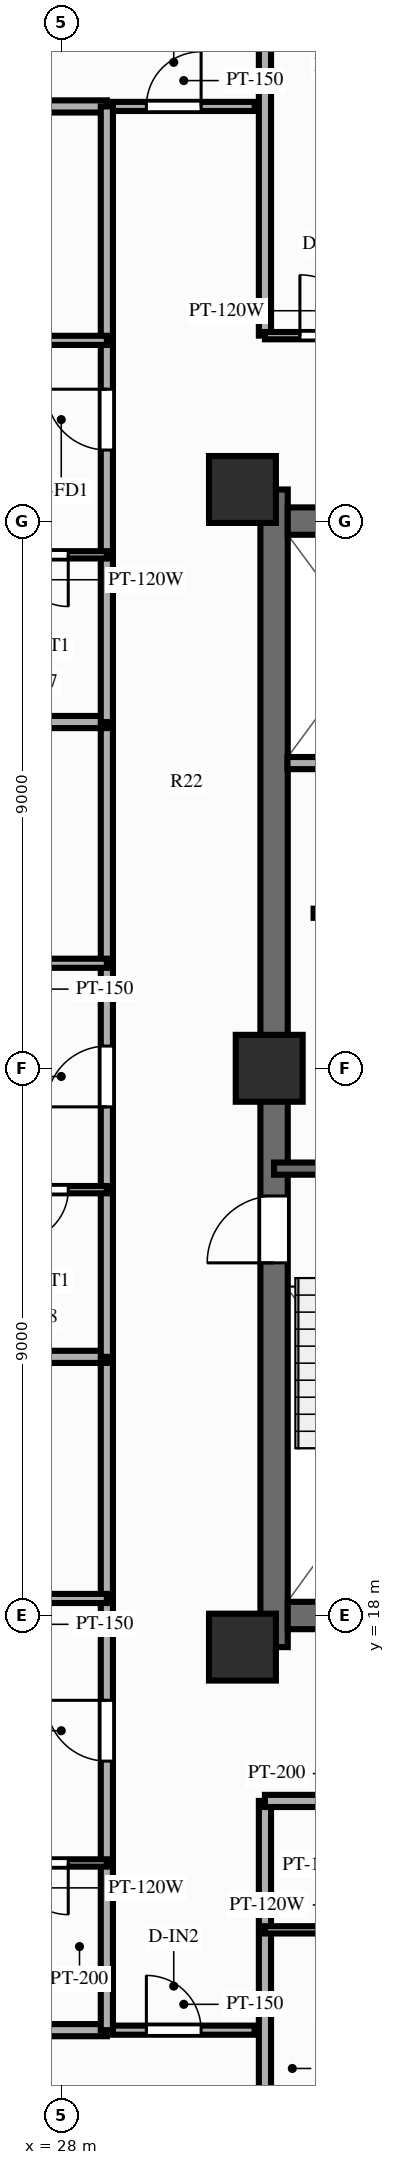
"""IFC4 building model, lengths in metres.
Left out: names, types, materials, properties, quantities, classifications, styles, units other than length and angle.
Written with IfcOpenShell. Run it as: python <this file> out.ifc"""

import sys

from ifc_helpers import new_model, si_unit, direction, frame, frame_2d, origin, origin_2d, place, context, subcontext, project, spatial, rectangle, extrude, source, transform, mapped, element, fill, save


model = new_model("IFC4")
c1 = context("Model", 3, precision=1e-05, world=origin(), true_north=direction((0.0, 1.0)))
c2 = subcontext(c1, "Body", "Model", "MODEL_VIEW")
j1 = project(units=[si_unit("LENGTHUNIT", "METRE"), si_unit("PLANEANGLEUNIT", "RADIAN")], contexts=[c1])
p1 = place(None, origin())
s1 = spatial("IfcSite", under=j1, at=p1, CompositionType="ELEMENT")
p2 = place(p1, origin())
s2 = spatial("IfcBuilding", under=s1, at=p2, CompositionType="ELEMENT")
p3 = place(p2, frame((0.0, 0.0, 182.8)))
s3 = spatial("IfcBuildingStorey", under=s2, at=p3, CompositionType="ELEMENT", Elevation=182.8)
p4 = place(p3, frame((31.5, 17.48, 0.0), z_axis=(0.0, 0.0, 1.0), x_axis=(0.0, 1.0, 0.0)))
e1 = element("IfcWall", 1, at=p4, inside=s3, PredefinedType="SHEAR", context=c2, shape_type="SweptSolid", body=[
    extrude(rectangle(XDim=19.04, YDim=0.45, at=frame_2d((9.52, 0.0))), origin(), (0.0, 0.0, 1.0), 3.9),
])
p5 = place(p4, frame((6.32, 0.0, 0.0)))
e2 = element("IfcOpeningElement", 2, at=p5, cuts=e1, PredefinedType="OPENING", context=c2, shape_type="SweptSolid", body=[
    extrude(rectangle(XDim=1.1, YDim=2.15, at=frame_2d((0.55, 1.075))), frame((0.0, 0.237, 0.0), z_axis=(0.0, -1.0, 0.0), x_axis=(1.0, 0.0, 0.0)), (0.0, 0.0, 1.0), 0.474),
])
p6 = place(p3, frame((31.725, 18.0, 0.0), z_axis=(0.0, 0.0, 1.0), x_axis=(1.0, 0.0, 0.0)))
e3 = element("IfcWall", 3, at=p6, inside=s3, PredefinedType="SHEAR", context=c2, shape_type="SweptSolid", body=[
    extrude(rectangle(XDim=12.55, YDim=0.45, at=frame_2d((6.275, 0.0))), origin(), (0.0, 0.0, 1.0), 3.9),
])
p7 = place(p3, frame((31.725, 36.0, 0.0), z_axis=(0.0, 0.0, 1.0), x_axis=(1.0, 0.0, 0.0)))
e4 = element("IfcWall", 4, at=p7, inside=s3, PredefinedType="SHEAR", context=c2, shape_type="SweptSolid", body=[
    extrude(rectangle(XDim=12.55, YDim=0.45, at=frame_2d((6.275, 0.0))), origin(), (0.0, 0.0, 1.0), 3.9),
])
p8 = place(p7, frame((5.225, 0.0, 0.0), z_axis=(0.0, 0.0, 1.0), x_axis=(-1.0, 0.0, 0.0)))
e5 = element("IfcOpeningElement", 5, at=p8, cuts=e4, PredefinedType="OPENING", context=c2, shape_type="SweptSolid", body=[
    extrude(rectangle(XDim=1.4, YDim=2.15, at=frame_2d((0.7, 1.075))), frame((0.0, 0.237, 0.0), z_axis=(0.0, -1.0, 0.0), x_axis=(1.0, 0.0, 0.0)), (0.0, 0.0, 1.0), 0.474),
])
m1 = source(origin(), c2, "Body", "SweptSolid", [
    extrude(rectangle(XDim=1.1, YDim=1.1, at=origin_2d()), origin(), (0.0, 0.0, 1.0), 3.9),
])
for number, where, z_axis, x_axis in (
    (6, (30.98, 17.48, 0.0), (0.0, 0.0, 1.0), (1.0, 0.0, 0.0)),
    (7, (30.98, 36.52, 0.0), (0.0, 0.0, 1.0), (1.0, 0.0, 0.0)),
    (8, (31.42, 27.0, 0.0), (0.0, 0.0, 1.0), (1.0, 0.0, 0.0)),
):
    element("IfcColumn", number, at=place(p3, frame(where, z_axis=z_axis, x_axis=x_axis)), inside=s3, PredefinedType="COLUMN", context=c2, shape_type="MappedRepresentation", body=[
        mapped(m1, transform((0.0, 0.0, 0.0), scale=1.0)),
    ])
p9 = place(p3, frame((32.15, 29.55, 0.0), z_axis=(0.0, 0.0, 1.0), x_axis=(1.0, 0.0, 0.0)))
e9 = element("IfcWall", 9, at=p9, inside=s3, PredefinedType="PARTITIONING", context=c2, shape_type="SweptSolid", body=[
    extrude(rectangle(XDim=2.27, YDim=0.15, at=frame_2d((1.135, 0.0))), origin(), (0.0, 0.0, 1.0), 3.69),
])
p10 = place(p3, frame((31.5, 25.35, 0.0), z_axis=(0.0, 0.0, 1.0), x_axis=(1.0, 0.0, 0.0)))
e10 = element("IfcWall", 10, at=p10, inside=s3, PredefinedType="SOLIDWALL", context=c2, shape_type="SweptSolid", body=[
    extrude(rectangle(XDim=3.93, YDim=0.2, at=frame_2d((1.965, 0.0))), origin(), (0.0, 0.0, 1.0), 3.69),
])
p11 = place(p3, frame((31.72, 32.02, 0.0), z_axis=(0.0, 0.0, 1.0), x_axis=(1.0, 0.0, 0.0)))
e11 = element("IfcWall", 11, at=p11, inside=s3, PredefinedType="PARTITIONING", context=c2, shape_type="SweptSolid", body=[
    extrude(rectangle(XDim=2.8, YDim=0.2, at=frame_2d((1.4, 0.0))), origin(), (0.0, 0.0, 1.0), 3.69),
])
p12 = place(p3, frame((28.85, 11.18, 0.0), z_axis=(0.0, 0.0, 1.0), x_axis=(1.0, 0.0, 0.0)))
e12 = element("IfcWall", 12, at=p12, inside=s3, PredefinedType="PARTITIONING", context=c2, shape_type="SweptSolid", body=[
    extrude(rectangle(XDim=2.33, YDim=0.15, at=frame_2d((1.165, 0.0))), origin(), (0.0, 0.0, 1.0), 3.69),
])
p13 = place(p12, frame((0.55, 0.0, 0.0)))
e13 = element("IfcOpeningElement", 13, at=p13, cuts=e12, PredefinedType="OPENING", context=c2, shape_type="SweptSolid", body=[
    extrude(rectangle(XDim=0.9, YDim=2.1, at=frame_2d((0.45, 1.05))), frame((0.0, 0.087, 0.0), z_axis=(0.0, -1.0, 0.0), x_axis=(1.0, 0.0, 0.0)), (0.0, 0.0, 1.0), 0.174),
])
p14 = place(p3, frame((28.85, 42.82, 0.0), z_axis=(0.0, 0.0, 1.0), x_axis=(1.0, 0.0, 0.0)))
e14 = element("IfcWall", 14, at=p14, inside=s3, PredefinedType="PARTITIONING", context=c2, shape_type="SweptSolid", body=[
    extrude(rectangle(XDim=2.33, YDim=0.15, at=frame_2d((1.165, 0.0))), origin(), (0.0, 0.0, 1.0), 3.69),
])
p15 = place(p14, frame((0.55, 0.0, 0.0)))
e15 = element("IfcOpeningElement", 15, at=p15, cuts=e14, PredefinedType="OPENING", context=c2, shape_type="SweptSolid", body=[
    extrude(rectangle(XDim=0.9, YDim=2.1, at=frame_2d((0.45, 1.05))), frame((0.0, 0.087, 0.0), z_axis=(0.0, -1.0, 0.0), x_axis=(1.0, 0.0, 0.0)), (0.0, 0.0, 1.0), 0.174),
])
p16 = place(p3, frame((31.35, 14.95, 0.0), z_axis=(0.0, 0.0, 1.0), x_axis=(0.0, -1.0, 0.0)))
e16 = element("IfcWall", 16, at=p16, inside=s3, PredefinedType="PARTITIONING", context=c2, shape_type="SweptSolid", body=[
    extrude(rectangle(XDim=8.8, YDim=0.2, at=frame_2d((4.4, 0.0))), origin(), (0.0, 0.0, 1.0), 2.79),
])
p17 = place(p3, frame((31.35, 14.95, 0.0), z_axis=(0.0, 0.0, 1.0), x_axis=(1.0, 0.0, 0.0)))
e17 = element("IfcWall", 17, at=p17, inside=s3, PredefinedType="PARTITIONING", context=c2, shape_type="SweptSolid", body=[
    extrude(rectangle(XDim=2.2, YDim=0.2, at=frame_2d((1.1, 0.0))), origin(), (0.0, 0.0, 1.0), 3.69),
])
p18 = place(p3, frame((31.35, 12.83, 0.0), z_axis=(0.0, 0.0, 1.0), x_axis=(1.0, 0.0, 0.0)))
e18 = element("IfcWall", 18, at=p18, inside=s3, PredefinedType="PARTITIONING", context=c2, shape_type="SweptSolid", body=[
    extrude(rectangle(XDim=2.2, YDim=0.12, at=frame_2d((1.1, 0.0))), origin(), (0.0, 0.0, 1.0), 3.69),
])
p19 = place(p3, frame((31.35, 39.05, 0.0), z_axis=(0.0, 0.0, 1.0), x_axis=(0.0, 1.0, 0.0)))
e19 = element("IfcWall", 19, at=p19, inside=s3, PredefinedType="PARTITIONING", context=c2, shape_type="SweptSolid", body=[
    extrude(rectangle(XDim=8.8, YDim=0.2, at=frame_2d((4.4, 0.0))), origin(), (0.0, 0.0, 1.0), 2.79),
])
p20 = place(p3, frame((31.35, 39.05, 0.0), z_axis=(0.0, 0.0, 1.0), x_axis=(1.0, 0.0, 0.0)))
e20 = element("IfcWall", 20, at=p20, inside=s3, PredefinedType="PARTITIONING", context=c2, shape_type="SweptSolid", body=[
    extrude(rectangle(XDim=2.15, YDim=0.12, at=frame_2d((1.075, 0.0))), origin(), (0.0, 0.0, 1.0), 3.69),
])
p21 = place(p20, frame((0.575, 0.0, 0.0)))
e21 = element("IfcOpeningElement", 21, at=p21, cuts=e20, PredefinedType="OPENING", context=c2, shape_type="SweptSolid", body=[
    extrude(rectangle(XDim=1.0, YDim=2.1, at=frame_2d((0.5, 1.05))), frame((0.0, 0.072, 0.0), z_axis=(0.0, -1.0, 0.0), x_axis=(1.0, 0.0, 0.0)), (0.0, 0.0, 1.0), 0.144),
])
for number, where, z_axis, x_axis in (
    (22, (28.75, 11.18, 0.0), (0.0, 0.0, 1.0), (-1.0, 0.0, 0.0)),
    (23, (28.75, 42.82, 0.0), (0.0, 0.0, 1.0), (-1.0, 0.0, 0.0)),
):
    element("IfcWall", number, at=place(p3, frame(where, z_axis=z_axis, x_axis=x_axis)), inside=s3, PredefinedType="PARTITIONING", context=c2, shape_type="SweptSolid", body=[
        extrude(rectangle(XDim=10.85, YDim=0.2, at=frame_2d((5.425, 0.0))), origin(), (0.0, 0.0, 1.0), 3.69),
    ])
p22 = place(p3, frame((28.75, 11.18, 0.0), z_axis=(0.0, 0.0, 1.0), x_axis=(0.0, 1.0, 0.0)))
e24 = element("IfcWall", 24, at=p22, inside=s3, PredefinedType="PARTITIONING", context=c2, shape_type="SweptSolid", body=[
    extrude(rectangle(XDim=2.75, YDim=0.2, at=frame_2d((1.375, 0.0))), origin(), (0.0, 0.0, 1.0), 3.69),
])
p23 = place(p3, frame((28.75, 13.93, 0.0), z_axis=(0.0, 0.0, 1.0), x_axis=(0.0, 1.0, 0.0)))
e25 = element("IfcWall", 25, at=p23, inside=s3, PredefinedType="PARTITIONING", context=c2, shape_type="SweptSolid", body=[
    extrude(rectangle(XDim=4.35, YDim=0.2, at=frame_2d((2.175, 0.0))), origin(), (0.0, 0.0, 1.0), 3.69),
])
p24 = place(p23, frame((1.675, 0.0, 0.0)))
e26 = element("IfcOpeningElement", 26, at=p24, cuts=e25, PredefinedType="OPENING", context=c2, shape_type="SweptSolid", body=[
    extrude(rectangle(XDim=1.0, YDim=2.15, at=frame_2d((0.5, 1.075))), frame((0.0, 0.112, 0.0), z_axis=(0.0, -1.0, 0.0), x_axis=(1.0, 0.0, 0.0)), (0.0, 0.0, 1.0), 0.224),
])
p25 = place(p3, frame((28.75, 18.28, 0.0), z_axis=(0.0, 0.0, 1.0), x_axis=(0.0, 1.0, 0.0)))
e27 = element("IfcWall", 27, at=p25, inside=s3, PredefinedType="PARTITIONING", context=c2, shape_type="SweptSolid", body=[
    extrude(rectangle(XDim=3.974, YDim=0.2, at=frame_2d((1.987, 0.0))), origin(), (0.0, 0.0, 1.0), 3.69),
])
p26 = place(p3, frame((28.75, 13.93, 0.0), z_axis=(0.0, 0.0, 1.0), x_axis=(-1.0, 0.0, 0.0)))
e28 = element("IfcWall", 28, at=p26, inside=s3, PredefinedType="PARTITIONING", context=c2, shape_type="SweptSolid", body=[
    extrude(rectangle(XDim=2.12, YDim=0.12, at=frame_2d((1.06, 0.0))), origin(), (0.0, 0.0, 1.0), 3.69),
])
p27 = place(p26, frame((0.635, 0.0, 0.0)))
e29 = element("IfcOpeningElement", 29, at=p27, cuts=e28, PredefinedType="OPENING", context=c2, shape_type="SweptSolid", body=[
    extrude(rectangle(XDim=0.85, YDim=2.05, at=frame_2d((0.425, 1.025))), frame((0.0, 0.072, 0.0), z_axis=(0.0, -1.0, 0.0), x_axis=(1.0, 0.0, 0.0)), (0.0, 0.0, 1.0), 0.144),
])
p28 = place(p3, frame((28.75, 18.28, 0.0), z_axis=(0.0, 0.0, 1.0), x_axis=(-1.0, 0.0, 0.0)))
e30 = element("IfcWall", 30, at=p28, inside=s3, PredefinedType="PARTITIONING", context=c2, shape_type="SweptSolid", body=[
    extrude(rectangle(XDim=3.16, YDim=0.15, at=frame_2d((1.58, 0.0))), origin(), (0.0, 0.0, 1.0), 3.69),
])
p29 = place(p28, frame((1.13, 0.0, 0.0)))
e31 = element("IfcOpeningElement", 31, at=p29, cuts=e30, PredefinedType="OPENING", context=c2, shape_type="SweptSolid", body=[
    extrude(rectangle(XDim=0.9, YDim=2.1, at=frame_2d((0.45, 1.05))), frame((0.0, 0.087, 0.0), z_axis=(0.0, -1.0, 0.0), x_axis=(1.0, 0.0, 0.0)), (0.0, 0.0, 1.0), 0.174),
])
p30 = place(p3, frame((28.75, 22.254, 0.0), z_axis=(0.0, 0.0, 1.0), x_axis=(-1.0, 0.0, 0.0)))
e32 = element("IfcWall", 32, at=p30, inside=s3, PredefinedType="PARTITIONING", context=c2, shape_type="SweptSolid", body=[
    extrude(rectangle(XDim=10.85, YDim=0.2, at=frame_2d((5.425, 0.0))), origin(), (0.0, 0.0, 1.0), 3.29),
])
p31 = place(p3, frame((28.75, 22.254, 0.0), z_axis=(0.0, 0.0, 1.0), x_axis=(0.0, 1.0, 0.0)))
e33 = element("IfcWall", 33, at=p31, inside=s3, PredefinedType="PARTITIONING", context=c2, shape_type="SweptSolid", body=[
    extrude(rectangle(XDim=2.75, YDim=0.2, at=frame_2d((1.375, 0.0))), origin(), (0.0, 0.0, 1.0), 3.69),
])
p32 = place(p3, frame((28.75, 25.004, 0.0), z_axis=(0.0, 0.0, 1.0), x_axis=(0.0, 1.0, 0.0)))
e34 = element("IfcWall", 34, at=p32, inside=s3, PredefinedType="PARTITIONING", context=c2, shape_type="SweptSolid", body=[
    extrude(rectangle(XDim=3.724, YDim=0.2, at=frame_2d((1.862, 0.0))), origin(), (0.0, 0.0, 1.0), 3.69),
])
p33 = place(p32, frame((1.362, 0.0, 0.0)))
e35 = element("IfcOpeningElement", 35, at=p33, cuts=e34, PredefinedType="OPENING", context=c2, shape_type="SweptSolid", body=[
    extrude(rectangle(XDim=1.0, YDim=2.15, at=frame_2d((0.5, 1.075))), frame((0.0, 0.112, 0.0), z_axis=(0.0, -1.0, 0.0), x_axis=(1.0, 0.0, 0.0)), (0.0, 0.0, 1.0), 0.224),
])
p34 = place(p3, frame((28.75, 28.728, 0.0), z_axis=(0.0, 0.0, 1.0), x_axis=(0.0, 1.0, 0.0)))
e36 = element("IfcWall", 36, at=p34, inside=s3, PredefinedType="PARTITIONING", context=c2, shape_type="SweptSolid", body=[
    extrude(rectangle(XDim=3.968, YDim=0.2, at=frame_2d((1.984, 0.0))), origin(), (0.0, 0.0, 1.0), 3.69),
])
p35 = place(p3, frame((28.75, 25.004, 0.0), z_axis=(0.0, 0.0, 1.0), x_axis=(-1.0, 0.0, 0.0)))
e37 = element("IfcWall", 37, at=p35, inside=s3, PredefinedType="PARTITIONING", context=c2, shape_type="SweptSolid", body=[
    extrude(rectangle(XDim=2.12, YDim=0.12, at=frame_2d((1.06, 0.0))), origin(), (0.0, 0.0, 1.0), 3.69),
])
p36 = place(p35, frame((0.635, 0.0, 0.0)))
e38 = element("IfcOpeningElement", 38, at=p36, cuts=e37, PredefinedType="OPENING", context=c2, shape_type="SweptSolid", body=[
    extrude(rectangle(XDim=0.85, YDim=2.05, at=frame_2d((0.425, 1.025))), frame((0.0, 0.072, 0.0), z_axis=(0.0, -1.0, 0.0), x_axis=(1.0, 0.0, 0.0)), (0.0, 0.0, 1.0), 0.144),
])
p37 = place(p3, frame((28.75, 28.728, 0.0), z_axis=(0.0, 0.0, 1.0), x_axis=(-1.0, 0.0, 0.0)))
e39 = element("IfcWall", 39, at=p37, inside=s3, PredefinedType="PARTITIONING", context=c2, shape_type="SweptSolid", body=[
    extrude(rectangle(XDim=3.16, YDim=0.15, at=frame_2d((1.58, 0.0))), origin(), (0.0, 0.0, 1.0), 3.69),
])
p38 = place(p37, frame((1.13, 0.0, 0.0)))
e40 = element("IfcOpeningElement", 40, at=p38, cuts=e39, PredefinedType="OPENING", context=c2, shape_type="SweptSolid", body=[
    extrude(rectangle(XDim=0.9, YDim=2.1, at=frame_2d((0.45, 1.05))), frame((0.0, 0.087, 0.0), z_axis=(0.0, -1.0, 0.0), x_axis=(1.0, 0.0, 0.0)), (0.0, 0.0, 1.0), 0.174),
])
p39 = place(p3, frame((28.75, 32.695, 0.0), z_axis=(0.0, 0.0, 1.0), x_axis=(-1.0, 0.0, 0.0)))
e41 = element("IfcWall", 41, at=p39, inside=s3, PredefinedType="PARTITIONING", context=c2, shape_type="SweptSolid", body=[
    extrude(rectangle(XDim=10.85, YDim=0.2, at=frame_2d((5.425, 0.0))), origin(), (0.0, 0.0, 1.0), 3.69),
])
p40 = place(p3, frame((28.75, 32.695, 0.0), z_axis=(0.0, 0.0, 1.0), x_axis=(0.0, 1.0, 0.0)))
e42 = element("IfcWall", 42, at=p40, inside=s3, PredefinedType="PARTITIONING", context=c2, shape_type="SweptSolid", body=[
    extrude(rectangle(XDim=2.75, YDim=0.2, at=frame_2d((1.375, 0.0))), origin(), (0.0, 0.0, 1.0), 3.69),
])
p41 = place(p3, frame((28.75, 35.445, 0.0), z_axis=(0.0, 0.0, 1.0), x_axis=(0.0, 1.0, 0.0)))
e43 = element("IfcWall", 43, at=p41, inside=s3, PredefinedType="PARTITIONING", context=c2, shape_type="SweptSolid", body=[
    extrude(rectangle(XDim=3.527, YDim=0.2, at=frame_2d((1.764, 0.0))), origin(), (0.0, 0.0, 1.0), 3.69),
])
p42 = place(p41, frame((1.724, 0.0, 0.0)))
e44 = element("IfcOpeningElement", 44, at=p42, cuts=e43, PredefinedType="OPENING", context=c2, shape_type="SweptSolid", body=[
    extrude(rectangle(XDim=1.0, YDim=2.15, at=frame_2d((0.5, 1.075))), frame((0.0, 0.112, 0.0), z_axis=(0.0, -1.0, 0.0), x_axis=(1.0, 0.0, 0.0)), (0.0, 0.0, 1.0), 0.224),
])
p43 = place(p3, frame((28.75, 38.973, 0.0), z_axis=(0.0, 0.0, 1.0), x_axis=(0.0, 1.0, 0.0)))
e45 = element("IfcWall", 45, at=p43, inside=s3, PredefinedType="PARTITIONING", context=c2, shape_type="SweptSolid", body=[
    extrude(rectangle(XDim=3.847, YDim=0.2, at=frame_2d((1.924, 0.0))), origin(), (0.0, 0.0, 1.0), 3.69),
])
p44 = place(p3, frame((28.75, 35.445, 0.0), z_axis=(0.0, 0.0, 1.0), x_axis=(-1.0, 0.0, 0.0)))
e46 = element("IfcWall", 46, at=p44, inside=s3, PredefinedType="PARTITIONING", context=c2, shape_type="SweptSolid", body=[
    extrude(rectangle(XDim=2.12, YDim=0.12, at=frame_2d((1.06, 0.0))), origin(), (0.0, 0.0, 1.0), 3.69),
])
p45 = place(p44, frame((0.635, 0.0, 0.0)))
e47 = element("IfcOpeningElement", 47, at=p45, cuts=e46, PredefinedType="OPENING", context=c2, shape_type="SweptSolid", body=[
    extrude(rectangle(XDim=0.85, YDim=2.05, at=frame_2d((0.425, 1.025))), frame((0.0, 0.072, 0.0), z_axis=(0.0, -1.0, 0.0), x_axis=(1.0, 0.0, 0.0)), (0.0, 0.0, 1.0), 0.144),
])
p46 = place(p3, frame((28.75, 38.973, 0.0), z_axis=(0.0, 0.0, 1.0), x_axis=(-1.0, 0.0, 0.0)))
e48 = element("IfcWall", 48, at=p46, inside=s3, PredefinedType="PARTITIONING", context=c2, shape_type="SweptSolid", body=[
    extrude(rectangle(XDim=3.16, YDim=0.15, at=frame_2d((1.58, 0.0))), origin(), (0.0, 0.0, 1.0), 3.69),
])
p47 = place(p46, frame((1.13, 0.0, 0.0)))
e49 = element("IfcOpeningElement", 49, at=p47, cuts=e48, PredefinedType="OPENING", context=c2, shape_type="SweptSolid", body=[
    extrude(rectangle(XDim=0.9, YDim=2.1, at=frame_2d((0.45, 1.05))), frame((0.0, 0.087, 0.0), z_axis=(0.0, -1.0, 0.0), x_axis=(1.0, 0.0, 0.0)), (0.0, 0.0, 1.0), 0.174),
])
m2 = source(origin(), c2, "Body", "SweptSolid", [
    extrude(rectangle(XDim=1.1, YDim=2.15, at=frame_2d((0.55, 1.075))), frame((0.0, 0.025, 0.0), z_axis=(0.0, -1.0, 0.0), x_axis=(1.0, 0.0, 0.0)), (0.0, 0.0, 1.0), 0.05),
])
p48 = place(p5, origin())
e50 = element("IfcDoor", 50, at=p48, inside=s3, OperationType="SINGLE_SWING_LEFT", PredefinedType="DOOR", context=c2, shape_type="MappedRepresentation", body=[
    mapped(m2, transform((0.0, 0.0, 0.0), scale=1.0)),
])
fill(e2, e50)
m3 = source(origin(), c2, "Body", "SweptSolid", [
    extrude(rectangle(XDim=0.9, YDim=2.1, at=frame_2d((0.45, 1.05))), frame((0.0, 0.025, 0.0), z_axis=(0.0, -1.0, 0.0), x_axis=(1.0, 0.0, 0.0)), (0.0, 0.0, 1.0), 0.05),
])
p49 = place(p13, origin())
e51 = element("IfcDoor", 51, at=p49, inside=s3, OperationType="SINGLE_SWING_LEFT", PredefinedType="DOOR", context=c2, shape_type="MappedRepresentation", body=[
    mapped(m3, transform((0.0, 0.0, 0.0), scale=1.0)),
])
fill(e13, e51)
p50 = place(p15, origin())
e52 = element("IfcDoor", 52, at=p50, inside=s3, OperationType="SINGLE_SWING_RIGHT", PredefinedType="DOOR", context=c2, shape_type="MappedRepresentation", body=[
    mapped(m3, transform((0.0, 0.0, 0.0), scale=1.0)),
])
fill(e15, e52)
m4 = source(origin(), c2, "Body", "SweptSolid", [
    extrude(rectangle(XDim=1.0, YDim=2.1, at=frame_2d((0.5, 1.05))), frame((0.0, 0.025, 0.0), z_axis=(0.0, -1.0, 0.0), x_axis=(1.0, 0.0, 0.0)), (0.0, 0.0, 1.0), 0.05),
])
p51 = place(p21, origin())
e53 = element("IfcDoor", 53, at=p51, inside=s3, OperationType="SINGLE_SWING_LEFT", PredefinedType="DOOR", context=c2, shape_type="MappedRepresentation", body=[
    mapped(m4, transform((0.0, 0.0, 0.0), scale=1.0)),
])
fill(e21, e53)
m5 = source(origin(), c2, "Body", "SweptSolid", [
    extrude(rectangle(XDim=1.0, YDim=2.15, at=frame_2d((0.5, 1.075))), frame((0.0, 0.025, 0.0), z_axis=(0.0, -1.0, 0.0), x_axis=(1.0, 0.0, 0.0)), (0.0, 0.0, 1.0), 0.05),
])
p52 = place(p24, origin())
e54 = element("IfcDoor", 54, at=p52, inside=s3, OperationType="SINGLE_SWING_RIGHT", PredefinedType="DOOR", context=c2, shape_type="MappedRepresentation", body=[
    mapped(m5, transform((0.0, 0.0, 0.0), scale=1.0)),
])
fill(e26, e54)
m6 = source(origin(), c2, "Body", "SweptSolid", [
    extrude(rectangle(XDim=0.85, YDim=2.05, at=frame_2d((0.425, 1.025))), frame((0.0, 0.025, 0.0), z_axis=(0.0, -1.0, 0.0), x_axis=(1.0, 0.0, 0.0)), (0.0, 0.0, 1.0), 0.05),
])
p53 = place(p27, origin())
e55 = element("IfcDoor", 55, at=p53, inside=s3, OperationType="SINGLE_SWING_LEFT", PredefinedType="DOOR", context=c2, shape_type="MappedRepresentation", body=[
    mapped(m6, transform((0.0, 0.0, 0.0), scale=1.0)),
])
fill(e29, e55)
p54 = place(p33, origin())
e56 = element("IfcDoor", 56, at=p54, inside=s3, OperationType="SINGLE_SWING_LEFT", PredefinedType="DOOR", context=c2, shape_type="MappedRepresentation", body=[
    mapped(m5, transform((0.0, 0.0, 0.0), scale=1.0)),
])
fill(e35, e56)
p55 = place(p36, origin())
e57 = element("IfcDoor", 57, at=p55, inside=s3, OperationType="SINGLE_SWING_RIGHT", PredefinedType="DOOR", context=c2, shape_type="MappedRepresentation", body=[
    mapped(m6, transform((0.0, 0.0, 0.0), scale=1.0)),
])
fill(e38, e57)
p56 = place(p42, origin())
e58 = element("IfcDoor", 58, at=p56, inside=s3, OperationType="SINGLE_SWING_RIGHT", PredefinedType="DOOR", context=c2, shape_type="MappedRepresentation", body=[
    mapped(m5, transform((0.0, 0.0, 0.0), scale=1.0)),
])
fill(e44, e58)
p57 = place(p45, origin())
e59 = element("IfcDoor", 59, at=p57, inside=s3, OperationType="SINGLE_SWING_LEFT", PredefinedType="DOOR", context=c2, shape_type="MappedRepresentation", body=[
    mapped(m6, transform((0.0, 0.0, 0.0), scale=1.0)),
])
fill(e47, e59)
save(model, sys.argv[1])
